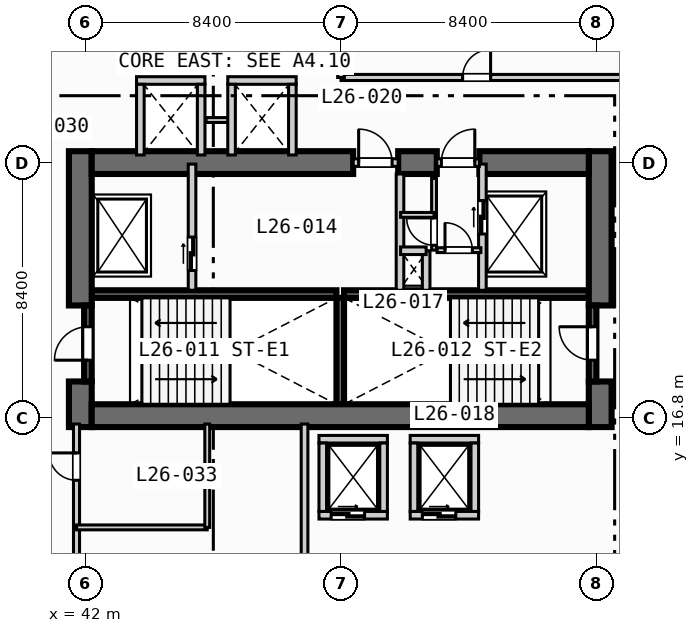
"""IFC4 building model, lengths in metres.
Left out: names, types, materials, properties, quantities, classifications, styles, units other than length and angle.
Written with IfcOpenShell. Run it as: python <this file> out.ifc"""

import sys

from ifc_helpers import new_model, si_unit, direction, frame, frame_2d, origin, place, context, subcontext, project, spatial, rectangle, extrude, element, fill, save


model = new_model("IFC4")
c1 = context("Model", 3, precision=1e-05, world=origin(), true_north=direction((0.0, 1.0)))
c2 = subcontext(c1, "Body", "Model", "MODEL_VIEW")
j1 = project(units=[si_unit("LENGTHUNIT", "METRE"), si_unit("PLANEANGLEUNIT", "RADIAN")], contexts=[c1])
p1 = place(None, origin())
s1 = spatial("IfcSite", under=j1, at=p1, CompositionType="ELEMENT")
p2 = place(p1, origin())
s2 = spatial("IfcBuilding", under=s1, at=p2, CompositionType="ELEMENT")
p3 = place(p2, frame((0.0, 0.0, 111.4)))
s3 = spatial("IfcBuildingStorey", under=s2, at=p3, CompositionType="ELEMENT", Elevation=111.4)
for number, where, z_axis, x_axis in (
    (1, (42.2, 20.875, 0.0), (0.0, 0.0, 1.0), (1.0, 0.0, 0.0)),
    (2, (50.5, 20.875, 0.0), (0.0, 0.0, 1.0), (1.0, 0.0, 0.0)),
):
    element("IfcWall", number, at=place(p3, frame(where, z_axis=z_axis, x_axis=x_axis)), inside=s3, PredefinedType="SOLIDWALL", context=c2, shape_type="SweptSolid", body=[
        extrude(rectangle(XDim=8.05, YDim=0.25, at=frame_2d((4.025, 0.0))), origin(), (0.0, 0.0, 1.0), 3.55),
    ])
p4 = place(p3, frame((50.375, 17.25, 0.0), z_axis=(0.0, 0.0, 1.0), x_axis=(0.0, 1.0, 0.0)))
e3 = element("IfcWall", 3, at=p4, inside=s3, PredefinedType="SOLIDWALL", context=c2, shape_type="SweptSolid", body=[
    extrude(rectangle(XDim=3.5, YDim=0.25, at=frame_2d((1.75, 0.0))), origin(), (0.0, 0.0, 1.0), 3.55),
])
p5 = place(p3, frame((41.825, 16.5, 0.0), z_axis=(0.0, 0.0, 1.0), x_axis=(0.0, 1.0, 0.0)))
e4 = element("IfcWall", 4, at=p5, inside=s3, PredefinedType="SHEAR", context=c2, shape_type="SweptSolid", body=[
    extrude(rectangle(XDim=1.5, YDim=0.75, at=frame_2d((0.75, 0.0))), origin(), (0.0, 0.0, 1.0), 3.55),
])
p6 = place(p3, frame((41.825, 20.5, 0.0), z_axis=(0.0, 0.0, 1.0), x_axis=(0.0, 1.0, 0.0)))
e5 = element("IfcWall", 5, at=p6, inside=s3, PredefinedType="SHEAR", context=c2, shape_type="SweptSolid", body=[
    extrude(rectangle(XDim=5.075, YDim=0.75, at=frame_2d((2.538, 0.0))), origin(), (0.0, 0.0, 1.0), 3.55),
])
p7 = place(p3, frame((58.925, 16.5, 0.0), z_axis=(0.0, 0.0, 1.0), x_axis=(0.0, 1.0, 0.0)))
e6 = element("IfcWall", 6, at=p7, inside=s3, PredefinedType="SHEAR", context=c2, shape_type="SweptSolid", body=[
    extrude(rectangle(XDim=1.5, YDim=0.75, at=frame_2d((0.75, 0.0))), origin(), (0.0, 0.0, 1.0), 3.55),
])
p8 = place(p3, frame((58.925, 20.5, 0.0), z_axis=(0.0, 0.0, 1.0), x_axis=(0.0, 1.0, 0.0)))
e7 = element("IfcWall", 7, at=p8, inside=s3, PredefinedType="SHEAR", context=c2, shape_type="SweptSolid", body=[
    extrude(rectangle(XDim=5.075, YDim=0.75, at=frame_2d((2.538, 0.0))), origin(), (0.0, 0.0, 1.0), 3.55),
])
p9 = place(p3, frame((42.2, 16.875, 0.0), z_axis=(0.0, 0.0, 1.0), x_axis=(1.0, 0.0, 0.0)))
e8 = element("IfcWall", 8, at=p9, inside=s3, PredefinedType="SHEAR", context=c2, shape_type="SweptSolid", body=[
    extrude(rectangle(XDim=16.35, YDim=0.75, at=frame_2d((8.175, 0.0))), origin(), (0.0, 0.0, 1.0), 3.55),
])
p10 = place(p3, frame((42.2, 25.2, 0.0), z_axis=(0.0, 0.0, 1.0), x_axis=(1.0, 0.0, 0.0)))
e9 = element("IfcWall", 9, at=p10, inside=s3, PredefinedType="SHEAR", context=c2, shape_type="SweptSolid", body=[
    extrude(rectangle(XDim=8.6, YDim=0.75, at=frame_2d((4.3, 0.0))), origin(), (0.0, 0.0, 1.0), 3.55),
])
p11 = place(p3, frame((52.28, 25.2, 0.0), z_axis=(0.0, 0.0, 1.0), x_axis=(1.0, 0.0, 0.0)))
e10 = element("IfcWall", 10, at=p11, inside=s3, PredefinedType="SHEAR", context=c2, shape_type="SweptSolid", body=[
    extrude(rectangle(XDim=1.27, YDim=0.75, at=frame_2d((0.635, 0.0))), origin(), (0.0, 0.0, 1.0), 3.55),
])
p12 = place(p3, frame((54.95, 25.2, 0.0), z_axis=(0.0, 0.0, 1.0), x_axis=(1.0, 0.0, 0.0)))
e11 = element("IfcWall", 11, at=p12, inside=s3, PredefinedType="SHEAR", context=c2, shape_type="SweptSolid", body=[
    extrude(rectangle(XDim=3.6, YDim=0.75, at=frame_2d((1.8, 0.0))), origin(), (0.0, 0.0, 1.0), 3.55),
])
p13 = place(p3, frame((42.075, 18.0, 0.0), z_axis=(0.0, 0.0, 1.0), x_axis=(0.0, 1.0, 0.0)))
e12 = element("IfcWall", 12, at=p13, inside=s3, PredefinedType="SOLIDWALL", context=c2, shape_type="SweptSolid", body=[
    extrude(rectangle(XDim=2.5, YDim=0.25, at=frame_2d((1.25, 0.0))), origin(), (0.0, 0.0, 1.0), 3.55),
])
p14 = place(p13, frame((0.7, 0.0, 0.0)))
e13 = element("IfcOpeningElement", 13, at=p14, cuts=e12, PredefinedType="OPENING", context=c2, shape_type="SweptSolid", body=[
    extrude(rectangle(XDim=1.1, YDim=2.15, at=frame_2d((0.55, 1.075))), frame((0.0, 0.135, 0.0), z_axis=(0.0, -1.0, 0.0), x_axis=(1.0, 0.0, 0.0)), (0.0, 0.0, 1.0), 0.27),
])
p15 = place(p3, frame((58.675, 18.0, 0.0), z_axis=(0.0, 0.0, 1.0), x_axis=(0.0, 1.0, 0.0)))
e14 = element("IfcWall", 14, at=p15, inside=s3, PredefinedType="SOLIDWALL", context=c2, shape_type="SweptSolid", body=[
    extrude(rectangle(XDim=2.5, YDim=0.25, at=frame_2d((1.25, 0.0))), origin(), (0.0, 0.0, 1.0), 3.55),
])
p16 = place(p15, frame((0.7, 0.0, 0.0)))
e15 = element("IfcOpeningElement", 15, at=p16, cuts=e14, PredefinedType="OPENING", context=c2, shape_type="SweptSolid", body=[
    extrude(rectangle(XDim=1.1, YDim=2.15, at=frame_2d((0.55, 1.075))), frame((0.0, 0.135, 0.0), z_axis=(0.0, -1.0, 0.0), x_axis=(1.0, 0.0, 0.0)), (0.0, 0.0, 1.0), 0.27),
])
p17 = place(p3, frame((45.5, 21.0, 0.0), z_axis=(0.0, 0.0, 1.0), x_axis=(0.0, 1.0, 0.0)))
e16 = element("IfcWall", 16, at=p17, inside=s3, PredefinedType="SOLIDWALL", context=c2, shape_type="SweptSolid", body=[
    extrude(rectangle(XDim=4.15, YDim=0.25, at=frame_2d((2.075, 0.0))), origin(), (0.0, 0.0, 1.0), 3.55),
])
p18 = place(p17, frame((0.65, 0.0, 0.0)))
e17 = element("IfcOpeningElement", 17, at=p18, cuts=e16, PredefinedType="OPENING", context=c2, shape_type="SweptSolid", body=[
    extrude(rectangle(XDim=1.1, YDim=2.15, at=frame_2d((0.55, 1.075))), frame((0.0, 0.135, 0.0), z_axis=(0.0, -1.0, 0.0), x_axis=(1.0, 0.0, 0.0)), (0.0, 0.0, 1.0), 0.27),
])
p19 = place(p3, frame((50.8, 25.2, 0.0), z_axis=(0.0, 0.0, 1.0), x_axis=(1.0, 0.0, 0.0)))
e18 = element("IfcWall", 18, at=p19, inside=s3, PredefinedType="SOLIDWALL", context=c2, shape_type="SweptSolid", body=[
    extrude(rectangle(XDim=1.48, YDim=0.25, at=frame_2d((0.74, 0.0))), origin(), (0.0, 0.0, 1.0), 3.55),
])
p20 = place(p19, frame((0.18, 0.0, 0.0)))
e19 = element("IfcOpeningElement", 19, at=p20, cuts=e18, PredefinedType="OPENING", context=c2, shape_type="SweptSolid", body=[
    extrude(rectangle(XDim=1.1, YDim=2.15, at=frame_2d((0.55, 1.075))), frame((0.0, 0.135, 0.0), z_axis=(0.0, -1.0, 0.0), x_axis=(1.0, 0.0, 0.0)), (0.0, 0.0, 1.0), 0.27),
])
p21 = place(p3, frame((52.34, 21.0, 0.0), z_axis=(0.0, 0.0, 1.0), x_axis=(0.0, 1.0, 0.0)))
e20 = element("IfcWall", 20, at=p21, inside=s3, PredefinedType="SOLIDWALL", context=c2, shape_type="SweptSolid", body=[
    extrude(rectangle(XDim=3.825, YDim=0.25, at=frame_2d((1.913, 0.0))), origin(), (0.0, 0.0, 1.0), 3.55),
])
p22 = place(p3, frame((55.05, 21.0, 0.0), z_axis=(0.0, 0.0, 1.0), x_axis=(0.0, 1.0, 0.0)))
e21 = element("IfcWall", 21, at=p22, inside=s3, PredefinedType="SOLIDWALL", context=c2, shape_type="SweptSolid", body=[
    extrude(rectangle(XDim=4.15, YDim=0.25, at=frame_2d((2.075, 0.0))), origin(), (0.0, 0.0, 1.0), 3.55),
])
p23 = place(p22, frame((1.85, 0.0, 0.0)))
e22 = element("IfcOpeningElement", 22, at=p23, cuts=e21, PredefinedType="OPENING", context=c2, shape_type="SweptSolid", body=[
    extrude(rectangle(XDim=1.1, YDim=2.15, at=frame_2d((0.55, 1.075))), frame((0.0, 0.135, 0.0), z_axis=(0.0, -1.0, 0.0), x_axis=(1.0, 0.0, 0.0)), (0.0, 0.0, 1.0), 0.27),
])
p24 = place(p3, frame((53.55, 25.2, 0.0), z_axis=(0.0, 0.0, 1.0), x_axis=(1.0, 0.0, 0.0)))
e23 = element("IfcWall", 23, at=p24, inside=s3, PredefinedType="SOLIDWALL", context=c2, shape_type="SweptSolid", body=[
    extrude(rectangle(XDim=1.4, YDim=0.25, at=frame_2d((0.7, 0.0))), origin(), (0.0, 0.0, 1.0), 3.55),
])
p25 = place(p24, frame((0.15, 0.0, 0.0)))
e24 = element("IfcOpeningElement", 24, at=p25, cuts=e23, PredefinedType="OPENING", context=c2, shape_type="SweptSolid", body=[
    extrude(rectangle(XDim=1.1, YDim=2.15, at=frame_2d((0.55, 1.075))), frame((0.0, 0.135, 0.0), z_axis=(0.0, -1.0, 0.0), x_axis=(1.0, 0.0, 0.0)), (0.0, 0.0, 1.0), 0.27),
])
p26 = place(p3, frame((53.2, 21.0, 0.0), z_axis=(0.0, 0.0, 1.0), x_axis=(0.0, 1.0, 0.0)))
e25 = element("IfcWall", 25, at=p26, inside=s3, PredefinedType="SOLIDWALL", context=c2, shape_type="SweptSolid", body=[
    extrude(rectangle(XDim=1.3, YDim=0.25, at=frame_2d((0.65, 0.0))), origin(), (0.0, 0.0, 1.0), 3.55),
])
p27 = place(p3, frame((52.36, 22.3, 0.0), z_axis=(0.0, 0.0, 1.0), x_axis=(1.0, 0.0, 0.0)))
e26 = element("IfcWall", 26, at=p27, inside=s3, PredefinedType="SOLIDWALL", context=c2, shape_type="SweptSolid", body=[
    extrude(rectangle(XDim=0.84, YDim=0.25, at=frame_2d((0.42, 0.0))), origin(), (0.0, 0.0, 1.0), 3.55),
])
p28 = place(p3, frame((53.56, 22.32, 0.0), z_axis=(0.0, 0.0, 1.0), x_axis=(1.0, 0.0, 0.0)))
e27 = element("IfcWall", 27, at=p28, inside=s3, PredefinedType="PARTITIONING", context=c2, shape_type="SweptSolid", body=[
    extrude(rectangle(XDim=1.44, YDim=0.16, at=frame_2d((0.72, 0.0))), origin(), (0.0, 0.0, 1.0), 3.55),
])
p29 = place(p28, frame((0.26, 0.0, 0.0)))
e28 = element("IfcOpeningElement", 28, at=p29, cuts=e27, PredefinedType="OPENING", context=c2, shape_type="SweptSolid", body=[
    extrude(rectangle(XDim=0.9, YDim=2.1, at=frame_2d((0.45, 1.05))), frame((0.0, 0.09, 0.0), z_axis=(0.0, -1.0, 0.0), x_axis=(1.0, 0.0, 0.0)), (0.0, 0.0, 1.0), 0.18),
])
p30 = place(p3, frame((53.46, 22.32, 0.0), z_axis=(0.0, 0.0, 1.0), x_axis=(0.0, 1.0, 0.0)))
e29 = element("IfcWall", 29, at=p30, inside=s3, PredefinedType="PARTITIONING", context=c2, shape_type="SweptSolid", body=[
    extrude(rectangle(XDim=2.36, YDim=0.16, at=frame_2d((1.18, 0.0))), origin(), (0.0, 0.0, 1.0), 3.55),
])
p31 = place(p30, frame((0.16, 0.0, 0.0)))
e30 = element("IfcOpeningElement", 30, at=p31, cuts=e29, PredefinedType="OPENING", context=c2, shape_type="SweptSolid", body=[
    extrude(rectangle(XDim=0.9, YDim=2.1, at=frame_2d((0.45, 1.05))), frame((0.0, 0.09, 0.0), z_axis=(0.0, -1.0, 0.0), x_axis=(1.0, 0.0, 0.0)), (0.0, 0.0, 1.0), 0.18),
])
p32 = place(p3, frame((52.36, 23.48, 0.0), z_axis=(0.0, 0.0, 1.0), x_axis=(1.0, 0.0, 0.0)))
e31 = element("IfcWall", 31, at=p32, inside=s3, PredefinedType="PARTITIONING", context=c2, shape_type="SweptSolid", body=[
    extrude(rectangle(XDim=1.1, YDim=0.16, at=frame_2d((0.55, 0.0))), origin(), (0.0, 0.0, 1.0), 3.55),
])
p33 = place(p3, frame((49.675, 13.6, 0.0), z_axis=(0.0, 0.0, 1.0), x_axis=(1.0, 0.0, 0.0)))
e32 = element("IfcWall", 32, at=p33, inside=s3, PredefinedType="SOLIDWALL", context=c2, shape_type="SweptSolid", body=[
    extrude(rectangle(XDim=2.25, YDim=0.25, at=frame_2d((1.125, 0.0))), origin(), (0.0, 0.0, 1.0), 3.55),
])
p34 = place(p33, frame((0.4, 0.0, 0.0)))
e33 = element("IfcOpeningElement", 33, at=p34, cuts=e32, PredefinedType="OPENING", context=c2, shape_type="SweptSolid", body=[
    extrude(rectangle(XDim=1.1, YDim=2.15, at=frame_2d((0.55, 1.075))), frame((0.0, 0.135, 0.0), z_axis=(0.0, -1.0, 0.0), x_axis=(1.0, 0.0, 0.0)), (0.0, 0.0, 1.0), 0.27),
])
for number, where, z_axis, x_axis in (
    (34, (49.675, 16.1, 0.0), (0.0, 0.0, 1.0), (1.0, 0.0, 0.0)),
    (35, (49.8, 13.725, 0.0), (0.0, 0.0, 1.0), (0.0, 1.0, 0.0)),
    (36, (51.8, 13.725, 0.0), (0.0, 0.0, 1.0), (0.0, 1.0, 0.0)),
):
    element("IfcWall", number, at=place(p3, frame(where, z_axis=z_axis, x_axis=x_axis)), inside=s3, PredefinedType="SOLIDWALL", context=c2, shape_type="SweptSolid", body=[
        extrude(rectangle(XDim=2.25, YDim=0.25, at=frame_2d((1.125, 0.0))), origin(), (0.0, 0.0, 1.0), 3.55),
    ])
p35 = place(p3, frame((52.675, 13.6, 0.0), z_axis=(0.0, 0.0, 1.0), x_axis=(1.0, 0.0, 0.0)))
e37 = element("IfcWall", 37, at=p35, inside=s3, PredefinedType="SOLIDWALL", context=c2, shape_type="SweptSolid", body=[
    extrude(rectangle(XDim=2.25, YDim=0.25, at=frame_2d((1.125, 0.0))), origin(), (0.0, 0.0, 1.0), 3.55),
])
p36 = place(p35, frame((0.4, 0.0, 0.0)))
e38 = element("IfcOpeningElement", 38, at=p36, cuts=e37, PredefinedType="OPENING", context=c2, shape_type="SweptSolid", body=[
    extrude(rectangle(XDim=1.1, YDim=2.15, at=frame_2d((0.55, 1.075))), frame((0.0, 0.135, 0.0), z_axis=(0.0, -1.0, 0.0), x_axis=(1.0, 0.0, 0.0)), (0.0, 0.0, 1.0), 0.27),
])
for number, where, z_axis, x_axis in (
    (39, (52.675, 16.1, 0.0), (0.0, 0.0, 1.0), (1.0, 0.0, 0.0)),
    (40, (52.8, 13.725, 0.0), (0.0, 0.0, 1.0), (0.0, 1.0, 0.0)),
    (41, (54.8, 13.725, 0.0), (0.0, 0.0, 1.0), (0.0, 1.0, 0.0)),
    (42, (43.675, 27.9, 0.0), (0.0, 0.0, 1.0), (1.0, 0.0, 0.0)),
):
    element("IfcWall", number, at=place(p3, frame(where, z_axis=z_axis, x_axis=x_axis)), inside=s3, PredefinedType="SOLIDWALL", context=c2, shape_type="SweptSolid", body=[
        extrude(rectangle(XDim=2.25, YDim=0.25, at=frame_2d((1.125, 0.0))), origin(), (0.0, 0.0, 1.0), 3.55),
    ])
for number, where, z_axis, x_axis in (
    (43, (43.8, 25.45, 0.0), (0.0, 0.0, 1.0), (0.0, 1.0, 0.0)),
    (44, (45.8, 25.45, 0.0), (0.0, 0.0, 1.0), (0.0, 1.0, 0.0)),
):
    element("IfcWall", number, at=place(p3, frame(where, z_axis=z_axis, x_axis=x_axis)), inside=s3, PredefinedType="SOLIDWALL", context=c2, shape_type="SweptSolid", body=[
        extrude(rectangle(XDim=2.325, YDim=0.25, at=frame_2d((1.163, 0.0))), origin(), (0.0, 0.0, 1.0), 3.55),
    ])
p37 = place(p3, frame((45.96, 26.6, 0.0), z_axis=(0.0, 0.0, 1.0), x_axis=(1.0, 0.0, 0.0)))
e45 = element("IfcWall", 45, at=p37, inside=s3, PredefinedType="PARTITIONING", context=c2, shape_type="SweptSolid", body=[
    extrude(rectangle(XDim=0.88, YDim=0.16, at=frame_2d((0.44, 0.0))), origin(), (0.0, 0.0, 1.0), 3.55),
])
p38 = place(p3, frame((46.675, 27.9, 0.0), z_axis=(0.0, 0.0, 1.0), x_axis=(1.0, 0.0, 0.0)))
e46 = element("IfcWall", 46, at=p38, inside=s3, PredefinedType="SOLIDWALL", context=c2, shape_type="SweptSolid", body=[
    extrude(rectangle(XDim=2.25, YDim=0.25, at=frame_2d((1.125, 0.0))), origin(), (0.0, 0.0, 1.0), 3.55),
])
for number, where, z_axis, x_axis in (
    (47, (46.8, 25.45, 0.0), (0.0, 0.0, 1.0), (0.0, 1.0, 0.0)),
    (48, (48.8, 25.45, 0.0), (0.0, 0.0, 1.0), (0.0, 1.0, 0.0)),
):
    element("IfcWall", number, at=place(p3, frame(where, z_axis=z_axis, x_axis=x_axis)), inside=s3, PredefinedType="SOLIDWALL", context=c2, shape_type="SweptSolid", body=[
        extrude(rectangle(XDim=2.325, YDim=0.25, at=frame_2d((1.163, 0.0))), origin(), (0.0, 0.0, 1.0), 3.55),
    ])
p39 = place(p3, frame((41.7, 0.35, 0.0), z_axis=(0.0, 0.0, 1.0), x_axis=(0.0, 1.0, 0.0)))
e49 = element("IfcWall", 49, at=p39, inside=s3, PredefinedType="PARTITIONING", context=c2, shape_type="SweptSolid", body=[
    extrude(rectangle(XDim=16.25, YDim=0.2, at=frame_2d((8.125, 0.0))), origin(), (0.0, 0.0, 1.0), 2.8),
])
p40 = place(p39, frame((5.0, 0.0, 0.0)))
e50 = element("IfcOpeningElement", 50, at=p40, cuts=e49, PredefinedType="OPENING", context=c2, shape_type="SweptSolid", body=[
    extrude(rectangle(XDim=0.92, YDim=2.1, at=frame_2d((0.46, 1.05))), frame((0.0, 0.11, 0.0), z_axis=(0.0, -1.0, 0.0), x_axis=(1.0, 0.0, 0.0)), (0.0, 0.0, 1.0), 0.22),
])
p41 = place(p39, frame((14.4, 0.0, 0.0)))
e51 = element("IfcOpeningElement", 51, at=p41, cuts=e49, PredefinedType="OPENING", context=c2, shape_type="SweptSolid", body=[
    extrude(rectangle(XDim=0.9, YDim=2.1, at=frame_2d((0.45, 1.05))), frame((0.0, 0.11, 0.0), z_axis=(0.0, -1.0, 0.0), x_axis=(1.0, 0.0, 0.0)), (0.0, 0.0, 1.0), 0.22),
])
p42 = place(p3, frame((49.2, 0.35, 0.0), z_axis=(0.0, 0.0, 1.0), x_axis=(0.0, 1.0, 0.0)))
e52 = element("IfcWall", 52, at=p42, inside=s3, PredefinedType="PARTITIONING", context=c2, shape_type="SweptSolid", body=[
    extrude(rectangle(XDim=16.25, YDim=0.22, at=frame_2d((8.125, 0.0))), origin(), (0.0, 0.0, 1.0), 3.55),
])
p43 = place(p3, frame((41.7, 13.2, 0.0), z_axis=(0.0, 0.0, 1.0), x_axis=(1.0, 0.0, 0.0)))
e53 = element("IfcWall", 53, at=p43, inside=s3, PredefinedType="PARTITIONING", context=c2, shape_type="SweptSolid", body=[
    extrude(rectangle(XDim=4.3, YDim=0.16, at=frame_2d((2.15, 0.0))), origin(), (0.0, 0.0, 1.0), 3.55),
])
p44 = place(p3, frame((46.0, 13.2, 0.0), z_axis=(0.0, 0.0, 1.0), x_axis=(0.0, 1.0, 0.0)))
e54 = element("IfcWall", 54, at=p44, inside=s3, PredefinedType="PARTITIONING", context=c2, shape_type="SweptSolid", body=[
    extrude(rectangle(XDim=3.4, YDim=0.16, at=frame_2d((1.7, 0.0))), origin(), (0.0, 0.0, 1.0), 3.55),
])
p45 = place(p3, frame((50.4, 28.0, 0.0), z_axis=(0.0, 0.0, 1.0), x_axis=(1.0, 0.0, 0.0)))
e55 = element("IfcWall", 55, at=p45, inside=s3, PredefinedType="PARTITIONING", context=c2, shape_type="SweptSolid", body=[
    extrude(rectangle(XDim=21.8, YDim=0.2, at=frame_2d((10.9, 0.0))), origin(), (0.0, 0.0, 1.0), 3.55),
])
p46 = place(p45, frame((4.0, 0.0, 0.0)))
e56 = element("IfcOpeningElement", 56, at=p46, cuts=e55, PredefinedType="OPENING", context=c2, shape_type="SweptSolid", body=[
    extrude(rectangle(XDim=0.92, YDim=2.1, at=frame_2d((0.46, 1.05))), frame((0.0, 0.11, 0.0), z_axis=(0.0, -1.0, 0.0), x_axis=(1.0, 0.0, 0.0)), (0.0, 0.0, 1.0), 0.22),
])
p47 = place(p3, frame((50.4, 28.0, 0.0), z_axis=(0.0, 0.0, 1.0), x_axis=(0.0, 1.0, 0.0)))
e57 = element("IfcWall", 57, at=p47, inside=s3, PredefinedType="PARTITIONING", context=c2, shape_type="SweptSolid", body=[
    extrude(rectangle(XDim=5.3, YDim=0.22, at=frame_2d((2.65, 0.0))), origin(), (0.0, 0.0, 1.0), 2.8),
])
p48 = place(p14, origin())
e58 = element("IfcDoor", 58, at=p48, inside=s3, OperationType="SINGLE_SWING_LEFT", PredefinedType="DOOR", context=c2, shape_type="SweptSolid", body=[
    extrude(rectangle(XDim=1.1, YDim=2.15, at=frame_2d((0.55, 1.075))), frame((0.0, 0.025, 0.0), z_axis=(0.0, -1.0, 0.0), x_axis=(1.0, 0.0, 0.0)), (0.0, 0.0, 1.0), 0.05),
])
fill(e13, e58)
p49 = place(p16, origin())
e59 = element("IfcDoor", 59, at=p49, inside=s3, OperationType="SINGLE_SWING_RIGHT", PredefinedType="DOOR", context=c2, shape_type="SweptSolid", body=[
    extrude(rectangle(XDim=1.1, YDim=2.15, at=frame_2d((0.55, 1.075))), frame((0.0, 0.025, 0.0), z_axis=(0.0, -1.0, 0.0), x_axis=(1.0, 0.0, 0.0)), (0.0, 0.0, 1.0), 0.05),
])
fill(e15, e59)
p50 = place(p18, origin())
e60 = element("IfcDoor", 60, at=p50, inside=s3, OperationType="SLIDING_TO_LEFT", PredefinedType="DOOR", context=c2, shape_type="SweptSolid", body=[
    extrude(rectangle(XDim=1.1, YDim=2.15, at=frame_2d((0.55, 1.075))), frame((0.0, 0.025, 0.0), z_axis=(0.0, -1.0, 0.0), x_axis=(1.0, 0.0, 0.0)), (0.0, 0.0, 1.0), 0.05),
])
fill(e17, e60)
p51 = place(p20, origin())
e61 = element("IfcDoor", 61, at=p51, inside=s3, OperationType="SINGLE_SWING_LEFT", PredefinedType="DOOR", context=c2, shape_type="SweptSolid", body=[
    extrude(rectangle(XDim=1.1, YDim=2.15, at=frame_2d((0.55, 1.075))), frame((0.0, 0.025, 0.0), z_axis=(0.0, -1.0, 0.0), x_axis=(1.0, 0.0, 0.0)), (0.0, 0.0, 1.0), 0.05),
])
fill(e19, e61)
p52 = place(p23, origin())
e62 = element("IfcDoor", 62, at=p52, inside=s3, OperationType="SLIDING_TO_LEFT", PredefinedType="DOOR", context=c2, shape_type="SweptSolid", body=[
    extrude(rectangle(XDim=1.1, YDim=2.15, at=frame_2d((0.55, 1.075))), frame((0.0, 0.025, 0.0), z_axis=(0.0, -1.0, 0.0), x_axis=(1.0, 0.0, 0.0)), (0.0, 0.0, 1.0), 0.05),
])
fill(e22, e62)
p53 = place(p25, origin())
e63 = element("IfcDoor", 63, at=p53, inside=s3, OperationType="SINGLE_SWING_RIGHT", PredefinedType="DOOR", context=c2, shape_type="SweptSolid", body=[
    extrude(rectangle(XDim=1.1, YDim=2.15, at=frame_2d((0.55, 1.075))), frame((0.0, 0.025, 0.0), z_axis=(0.0, -1.0, 0.0), x_axis=(1.0, 0.0, 0.0)), (0.0, 0.0, 1.0), 0.05),
])
fill(e24, e63)
p54 = place(p29, origin())
e64 = element("IfcDoor", 64, at=p54, inside=s3, OperationType="SINGLE_SWING_LEFT", PredefinedType="DOOR", context=c2, shape_type="SweptSolid", body=[
    extrude(rectangle(XDim=0.9, YDim=2.1, at=frame_2d((0.45, 1.05))), frame((0.0, 0.025, 0.0), z_axis=(0.0, -1.0, 0.0), x_axis=(1.0, 0.0, 0.0)), (0.0, 0.0, 1.0), 0.05),
])
fill(e28, e64)
p55 = place(p31, origin())
e65 = element("IfcDoor", 65, at=p55, inside=s3, OperationType="SINGLE_SWING_RIGHT", PredefinedType="DOOR", context=c2, shape_type="SweptSolid", body=[
    extrude(rectangle(XDim=0.9, YDim=2.1, at=frame_2d((0.45, 1.05))), frame((0.0, 0.025, 0.0), z_axis=(0.0, -1.0, 0.0), x_axis=(1.0, 0.0, 0.0)), (0.0, 0.0, 1.0), 0.05),
])
fill(e30, e65)
p56 = place(p34, origin())
e66 = element("IfcDoor", 66, at=p56, inside=s3, OperationType="SLIDING_TO_LEFT", PredefinedType="DOOR", context=c2, shape_type="SweptSolid", body=[
    extrude(rectangle(XDim=1.1, YDim=2.15, at=frame_2d((0.55, 1.075))), frame((0.0, 0.025, 0.0), z_axis=(0.0, -1.0, 0.0), x_axis=(1.0, 0.0, 0.0)), (0.0, 0.0, 1.0), 0.05),
])
fill(e33, e66)
p57 = place(p36, origin())
e67 = element("IfcDoor", 67, at=p57, inside=s3, OperationType="SLIDING_TO_LEFT", PredefinedType="DOOR", context=c2, shape_type="SweptSolid", body=[
    extrude(rectangle(XDim=1.1, YDim=2.15, at=frame_2d((0.55, 1.075))), frame((0.0, 0.025, 0.0), z_axis=(0.0, -1.0, 0.0), x_axis=(1.0, 0.0, 0.0)), (0.0, 0.0, 1.0), 0.05),
])
fill(e38, e67)
p58 = place(p41, origin())
e68 = element("IfcDoor", 68, at=p58, inside=s3, OperationType="SINGLE_SWING_RIGHT", PredefinedType="DOOR", context=c2, shape_type="SweptSolid", body=[
    extrude(rectangle(XDim=0.9, YDim=2.1, at=frame_2d((0.45, 1.05))), frame((0.0, 0.025, 0.0), z_axis=(0.0, -1.0, 0.0), x_axis=(1.0, 0.0, 0.0)), (0.0, 0.0, 1.0), 0.05),
])
fill(e51, e68)
p59 = place(p46, origin())
e69 = element("IfcDoor", 69, at=p59, inside=s3, OperationType="SINGLE_SWING_RIGHT", PredefinedType="DOOR", context=c2, shape_type="SweptSolid", body=[
    extrude(rectangle(XDim=0.92, YDim=2.1, at=frame_2d((0.46, 1.05))), frame((0.0, 0.025, 0.0), z_axis=(0.0, -1.0, 0.0), x_axis=(1.0, 0.0, 0.0)), (0.0, 0.0, 1.0), 0.05),
])
fill(e56, e69)
save(model, sys.argv[1])
